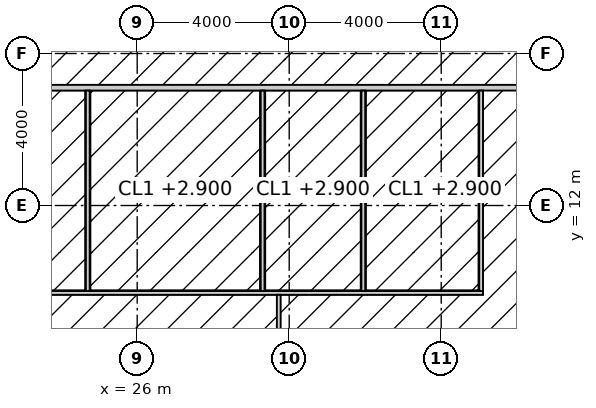
"""IFC4 building model, lengths in metres.
Left out: names, types, materials, properties, quantities, classifications, styles, units other than length and angle.
Written with IfcOpenShell. Run it as: python <this file> out.ifc"""

import sys

from ifc_helpers import new_model, si_unit, direction, frame, frame_2d, origin, place, context, subcontext, project, spatial, rectangle, extrude, element, fill, save


model = new_model("IFC4")
c1 = context("Model", 3, precision=1e-05, world=origin(), true_north=direction((0.0, 1.0)))
c2 = subcontext(c1, "Body", "Model", "MODEL_VIEW")
j1 = project(units=[si_unit("LENGTHUNIT", "METRE"), si_unit("PLANEANGLEUNIT", "RADIAN")], contexts=[c1])
p1 = place(None, origin())
s1 = spatial("IfcSite", under=j1, at=p1, CompositionType="ELEMENT")
p2 = place(p1, origin())
s2 = spatial("IfcBuilding", under=s1, at=p2, CompositionType="ELEMENT")
p3 = place(p2, frame((0.0, 0.0, 159.8)))
s3 = spatial("IfcBuildingStorey", under=s2, at=p3, CompositionType="ELEMENT", Elevation=159.8)
p4 = place(p3, frame((17.5, 15.1, 0.0), z_axis=(0.0, 0.0, 1.0), x_axis=(1.0, 0.0, 0.0)))
e1 = element("IfcWall", 1, at=p4, inside=s3, PredefinedType="PARTITIONING", context=c2, shape_type="SweptSolid", body=[
    extrude(rectangle(XDim=20.325, YDim=0.15, at=frame_2d((10.163, 0.0))), origin(), (0.0, 0.0, 1.0), 3.85),
])
p5 = place(p3, frame((17.45, 9.7, 0.0), z_axis=(0.0, 0.0, 1.0), x_axis=(1.0, 0.0, 0.0)))
e2 = element("IfcWall", 2, at=p5, inside=s3, PredefinedType="PARTITIONING", context=c2, shape_type="SweptSolid", body=[
    extrude(rectangle(XDim=17.65, YDim=0.1, at=frame_2d((8.825, 0.0))), origin(), (0.0, 0.0, 1.0), 3.85),
])
p6 = place(p5, frame((2.75, 0.0, 0.0)))
e3 = element("IfcOpeningElement", 3, at=p6, cuts=e2, PredefinedType="OPENING", context=c2, shape_type="SweptSolid", body=[
    extrude(rectangle(XDim=1.8, YDim=2.4, at=frame_2d((0.9, 1.2))), frame((0.0, 0.06, 0.0), z_axis=(0.0, -1.0, 0.0), x_axis=(1.0, 0.0, 0.0)), (0.0, 0.0, 1.0), 0.12),
])
p7 = place(p5, frame((9.05, 0.0, 0.0)))
e4 = element("IfcOpeningElement", 4, at=p7, cuts=e2, PredefinedType="OPENING", context=c2, shape_type="SweptSolid", body=[
    extrude(rectangle(XDim=1.0, YDim=2.2, at=frame_2d((0.5, 1.1))), frame((0.0, 0.06, 0.0), z_axis=(0.0, -1.0, 0.0), x_axis=(1.0, 0.0, 0.0)), (0.0, 0.0, 1.0), 0.12),
])
p8 = place(p5, frame((12.675, 0.0, 0.0)))
e5 = element("IfcOpeningElement", 5, at=p8, cuts=e2, PredefinedType="OPENING", context=c2, shape_type="SweptSolid", body=[
    extrude(rectangle(XDim=1.0, YDim=2.2, at=frame_2d((0.5, 1.1))), frame((0.0, 0.06, 0.0), z_axis=(0.0, -1.0, 0.0), x_axis=(1.0, 0.0, 0.0)), (0.0, 0.0, 1.0), 0.12),
])
p9 = place(p5, frame((15.55, 0.0, 0.0)))
e6 = element("IfcOpeningElement", 6, at=p9, cuts=e2, PredefinedType="OPENING", context=c2, shape_type="SweptSolid", body=[
    extrude(rectangle(XDim=1.0, YDim=2.2, at=frame_2d((0.5, 1.1))), frame((0.0, 0.06, 0.0), z_axis=(0.0, -1.0, 0.0), x_axis=(1.0, 0.0, 0.0)), (0.0, 0.0, 1.0), 0.12),
])
for number, where, z_axis, x_axis in (
    (7, (24.7, 9.75, 0.0), (0.0, 0.0, 1.0), (0.0, 1.0, 0.0)),
    (8, (29.3, 9.75, 0.0), (0.0, 0.0, 1.0), (0.0, 1.0, 0.0)),
    (9, (31.95, 9.75, 0.0), (0.0, 0.0, 1.0), (0.0, 1.0, 0.0)),
    (10, (35.05, 9.75, 0.0), (0.0, 0.0, 1.0), (0.0, 1.0, 0.0)),
):
    element("IfcWall", number, at=place(p3, frame(where, z_axis=z_axis, x_axis=x_axis)), inside=s3, PredefinedType="PARTITIONING", context=c2, shape_type="SweptSolid", body=[
        extrude(rectangle(XDim=5.275, YDim=0.1, at=frame_2d((2.637, 0.0))), origin(), (0.0, 0.0, 1.0), 3.85),
    ])
p10 = place(p3, frame((29.725, 9.65, 0.0), z_axis=(0.0, 0.0, 1.0), x_axis=(0.0, -1.0, 0.0)))
e11 = element("IfcWall", 11, at=p10, inside=s3, PredefinedType="PARTITIONING", context=c2, shape_type="SweptSolid", body=[
    extrude(rectangle(XDim=5.35, YDim=0.1, at=frame_2d((2.675, 0.0))), origin(), (0.0, 0.0, 1.0), 2.95),
])
p11 = place(p7, origin())
e12 = element("IfcDoor", 12, at=p11, inside=s3, OperationType="SINGLE_SWING_LEFT", PredefinedType="DOOR", context=c2, shape_type="SweptSolid", body=[
    extrude(rectangle(XDim=1.0, YDim=2.2, at=frame_2d((0.5, 1.1))), frame((0.0, 0.025, 0.0), z_axis=(0.0, -1.0, 0.0), x_axis=(1.0, 0.0, 0.0)), (0.0, 0.0, 1.0), 0.05),
])
fill(e4, e12)
p12 = place(p8, origin())
e13 = element("IfcDoor", 13, at=p12, inside=s3, OperationType="SINGLE_SWING_LEFT", PredefinedType="DOOR", context=c2, shape_type="SweptSolid", body=[
    extrude(rectangle(XDim=1.0, YDim=2.2, at=frame_2d((0.5, 1.1))), frame((0.0, 0.025, 0.0), z_axis=(0.0, -1.0, 0.0), x_axis=(1.0, 0.0, 0.0)), (0.0, 0.0, 1.0), 0.05),
])
fill(e5, e13)
p13 = place(p9, origin())
e14 = element("IfcDoor", 14, at=p13, inside=s3, OperationType="SINGLE_SWING_LEFT", PredefinedType="DOOR", context=c2, shape_type="SweptSolid", body=[
    extrude(rectangle(XDim=1.0, YDim=2.2, at=frame_2d((0.5, 1.1))), frame((0.0, 0.025, 0.0), z_axis=(0.0, -1.0, 0.0), x_axis=(1.0, 0.0, 0.0)), (0.0, 0.0, 1.0), 0.05),
])
fill(e6, e14)
save(model, sys.argv[1])
